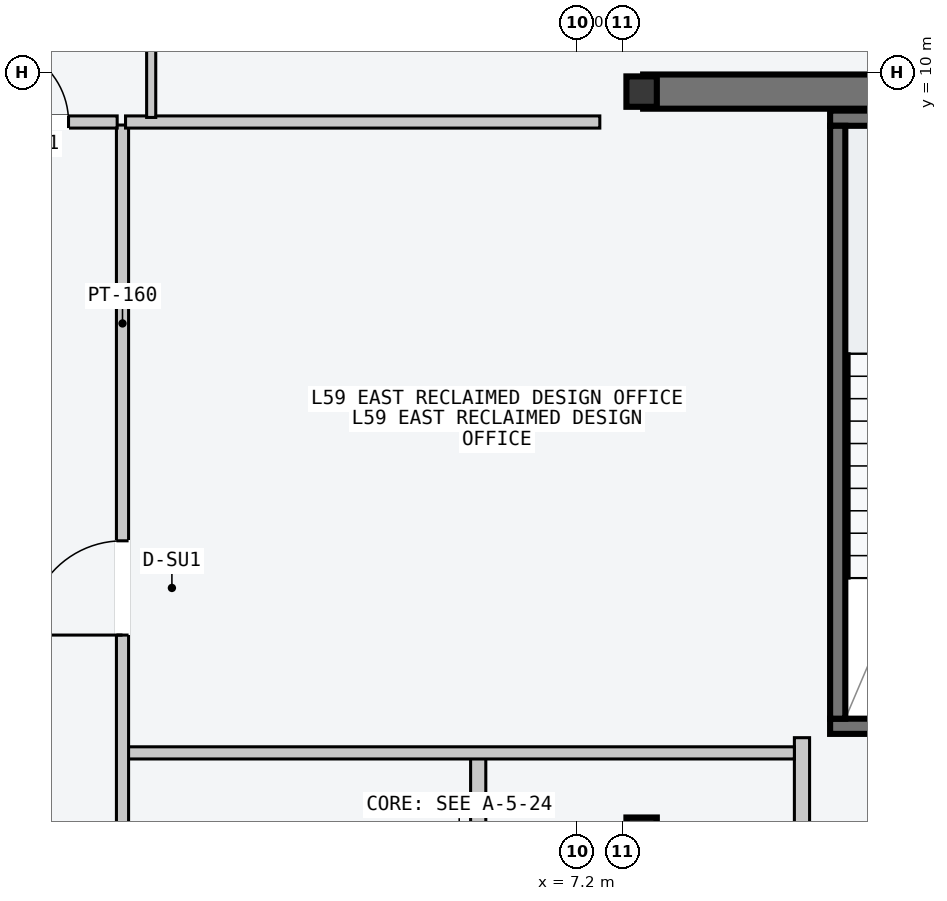
"""IFC4 building model, lengths in metres.
Left out: names, types, materials, properties, quantities, classifications, styles, units other than length and angle.
Written with IfcOpenShell. Run it as: python <this file> out.ifc"""

import sys

from ifc_helpers import new_model, si_unit, direction, frame, frame_2d, origin, origin_2d, place, context, subcontext, project, spatial, rectangle, i_section, extrude, element, fill, save


model = new_model("IFC4")
c1 = context("Model", 3, precision=1e-05, world=origin(), true_north=direction((0.0, 1.0)))
c2 = subcontext(c1, "Body", "Model", "MODEL_VIEW")
j1 = project(units=[si_unit("LENGTHUNIT", "METRE"), si_unit("PLANEANGLEUNIT", "RADIAN")], contexts=[c1])
p1 = place(None, origin())
s1 = spatial("IfcSite", under=j1, at=p1, CompositionType="ELEMENT")
p2 = place(p1, origin())
s2 = spatial("IfcBuilding", under=s1, at=p2, CompositionType="ELEMENT")
p3 = place(p2, frame((0.0, 0.0, 225.6)))
s3 = spatial("IfcBuildingStorey", under=s2, at=p3, CompositionType="ELEMENT", Elevation=225.6)
p4 = place(p3, frame((8.07, 9.75, -0.2), z_axis=(0.0, 0.0, 1.0), x_axis=(1.0, 0.0, 0.0)))
e1 = element("IfcWall", 1, at=p4, inside=s3, PredefinedType="SHEAR", context=c2, shape_type="SweptSolid", body=[
    extrude(rectangle(XDim=6.46, YDim=0.45, at=frame_2d((3.23, 0.0))), origin(), (0.0, 0.0, 1.0), 3.6),
])
p5 = place(p3, frame((10.53, 1.4, -0.2), z_axis=(0.0, 0.0, 1.0), x_axis=(1.0, 0.0, 0.0)))
e2 = element("IfcWall", 2, at=p5, inside=s3, PredefinedType="SOLIDWALL", context=c2, shape_type="SweptSolid", body=[
    extrude(rectangle(XDim=3.72, YDim=0.2, at=frame_2d((1.86, 0.0))), origin(), (0.0, 0.0, 1.0), 3.6),
])
p6 = place(p5, frame((1.5, 0.0, 0.2)))
e3 = element("IfcOpeningElement", 3, at=p6, cuts=e2, PredefinedType="OPENING", context=c2, shape_type="SweptSolid", body=[
    extrude(rectangle(XDim=1.12, YDim=2.18, at=frame_2d((0.56, 1.09))), frame((0.0, 0.11, 0.0), z_axis=(0.0, -1.0, 0.0), x_axis=(1.0, 0.0, 0.0)), (0.0, 0.0, 1.0), 0.22),
])
p7 = place(p3, frame((10.53, 9.4, -0.2), z_axis=(0.0, 0.0, 1.0), x_axis=(1.0, 0.0, 0.0)))
e4 = element("IfcWall", 4, at=p7, inside=s3, PredefinedType="SOLIDWALL", context=c2, shape_type="SweptSolid", body=[
    extrude(rectangle(XDim=3.72, YDim=0.2, at=frame_2d((1.86, 0.0))), origin(), (0.0, 0.0, 1.0), 3.6),
])
p8 = place(p3, frame((10.63, 1.5, -0.2), z_axis=(0.0, 0.0, 1.0), x_axis=(0.0, 1.0, 0.0)))
e5 = element("IfcWall", 5, at=p8, inside=s3, PredefinedType="SOLIDWALL", context=c2, shape_type="SweptSolid", body=[
    extrude(rectangle(XDim=7.8, YDim=0.2, at=frame_2d((3.9, 0.0))), origin(), (0.0, 0.0, 1.0), 3.6),
])
for number, where, z_axis, x_axis in (
    (6, (8.05, 0.0, 0.0), (0.0, 0.0, 1.0), (1.0, 0.0, 0.0)),
    (7, (8.05, 9.75, 0.0), (0.0, 0.0, 1.0), (1.0, 0.0, 0.0)),
):
    element("IfcColumn", number, at=place(p3, frame(where, z_axis=z_axis, x_axis=x_axis)), inside=s3, PredefinedType="COLUMN", context=c2, shape_type="SweptSolid", body=[
        extrude(i_section(OverallWidth=0.4, OverallDepth=0.4, WebThickness=0.013, FlangeThickness=0.021, at=origin_2d()), origin(), (0.0, 0.0, 1.0), 3.6),
    ])
p9 = place(p3, frame((5.9, -9.45, 0.0), z_axis=(0.0, 0.0, 1.0), x_axis=(0.0, 1.0, 0.0)))
e8 = element("IfcWall", 8, at=p9, inside=s3, PredefinedType="PARTITIONING", context=c2, shape_type="SweptSolid", body=[
    extrude(rectangle(XDim=10.5, YDim=0.2, at=frame_2d((5.25, 0.0))), origin(), (0.0, 0.0, 1.0), 3.4),
])
p10 = place(p9, frame((3.9, 0.0, 0.0)))
e9 = element("IfcOpeningElement", 9, at=p10, cuts=e8, PredefinedType="OPENING", context=c2, shape_type="SweptSolid", body=[
    extrude(rectangle(XDim=1.5, YDim=2.2, at=frame_2d((0.75, 1.1))), frame((0.0, 0.11, 0.0), z_axis=(0.0, -1.0, 0.0), x_axis=(1.0, 0.0, 0.0)), (0.0, 0.0, 1.0), 0.22),
])
p11 = place(p3, frame((10.16, -2.55, 0.0), z_axis=(0.0, 0.0, 1.0), x_axis=(0.0, 1.0, 0.0)))
e10 = element("IfcWall", 10, at=p11, inside=s3, PredefinedType="PARTITIONING", context=c2, shape_type="SweptSolid", body=[
    extrude(rectangle(XDim=3.8, YDim=0.2, at=frame_2d((1.9, 0.0))), origin(), (0.0, 0.0, 1.0), 3.4),
])
p12 = place(p11, frame((1.3, 0.0, 0.0)))
e11 = element("IfcOpeningElement", 11, at=p12, cuts=e10, PredefinedType="OPENING", context=c2, shape_type="SweptSolid", body=[
    extrude(rectangle(XDim=1.1, YDim=2.15, at=frame_2d((0.55, 1.075))), frame((0.0, 0.11, 0.0), z_axis=(0.0, -1.0, 0.0), x_axis=(1.0, 0.0, 0.0)), (0.0, 0.0, 1.0), 0.22),
])
p13 = place(p3, frame((1.26, 1.05, 0.0), z_axis=(0.0, 0.0, 1.0), x_axis=(1.0, 0.0, 0.0)))
e12 = element("IfcWall", 12, at=p13, inside=s3, PredefinedType="PARTITIONING", context=c2, shape_type="SweptSolid", body=[
    extrude(rectangle(XDim=8.8, YDim=0.16, at=frame_2d((4.4, 0.0))), origin(), (0.0, 0.0, 1.0), 3.4),
])
p14 = place(p3, frame((1.22, -3.5, 0.0), z_axis=(0.0, 0.0, 1.0), x_axis=(0.0, 1.0, 0.0)))
e13 = element("IfcWall", 13, at=p14, inside=s3, PredefinedType="PARTITIONING", context=c2, shape_type="SweptSolid", body=[
    extrude(rectangle(XDim=12.81, YDim=0.16, at=frame_2d((6.405, 0.0))), origin(), (0.0, 0.0, 1.0), 3.4),
])
p15 = place(p14, frame((6.1, 0.0, 0.0)))
e14 = element("IfcOpeningElement", 14, at=p15, cuts=e13, PredefinedType="OPENING", context=c2, shape_type="SweptSolid", body=[
    extrude(rectangle(XDim=1.24, YDim=2.24, at=frame_2d((0.62, 1.12))), frame((0.0, 0.09, 0.0), z_axis=(0.0, -1.0, 0.0), x_axis=(1.0, 0.0, 0.0)), (0.0, 0.0, 1.0), 0.18),
])
p16 = place(p14, frame((1.6, 0.0, 0.0)))
e15 = element("IfcOpeningElement", 15, at=p16, cuts=e13, PredefinedType="OPENING", context=c2, shape_type="SweptSolid", body=[
    extrude(rectangle(XDim=0.96, YDim=2.18, at=frame_2d((0.48, 1.09))), frame((0.0, 0.09, 0.0), z_axis=(0.0, -1.0, 0.0), x_axis=(1.0, 0.0, 0.0)), (0.0, 0.0, 1.0), 0.18),
])
p17 = place(p3, frame((1.26, 9.35, 0.0), z_axis=(0.0, 0.0, 1.0), x_axis=(1.0, 0.0, 0.0)))
e16 = element("IfcWall", 16, at=p17, inside=s3, PredefinedType="PARTITIONING", context=c2, shape_type="SweptSolid", body=[
    extrude(rectangle(XDim=6.24, YDim=0.16, at=frame_2d((3.12, 0.0))), origin(), (0.0, 0.0, 1.0), 3.4),
])
p18 = place(p3, frame((1.597, 9.41, 0.0), z_axis=(0.0, 0.0, 1.0), x_axis=(0.0, 1.0, 0.0)))
e17 = element("IfcWall", 17, at=p18, inside=s3, PredefinedType="PARTITIONING", context=c2, shape_type="SweptSolid", body=[
    extrude(rectangle(XDim=7.14, YDim=0.12, at=frame_2d((3.57, 0.0))), origin(), (0.0, 0.0, 1.0), 3.4),
])
p19 = place(p18, frame((1.15, 0.0, 0.0)))
e18 = element("IfcOpeningElement", 18, at=p19, cuts=e17, PredefinedType="OPENING", context=c2, shape_type="SweptSolid", body=[
    extrude(rectangle(XDim=0.96, YDim=2.18, at=frame_2d((0.48, 1.09))), frame((0.0, 0.07, 0.0), z_axis=(0.0, -1.0, 0.0), x_axis=(1.0, 0.0, 0.0)), (0.0, 0.0, 1.0), 0.14),
])
p20 = place(p3, frame((-1.15, 9.35, 0.0), z_axis=(0.0, 0.0, 1.0), x_axis=(1.0, 0.0, 0.0)))
e19 = element("IfcWall", 19, at=p20, inside=s3, PredefinedType="PARTITIONING", context=c2, shape_type="SweptSolid", body=[
    extrude(rectangle(XDim=2.3, YDim=0.16, at=frame_2d((1.15, 0.0))), origin(), (0.0, 0.0, 1.0), 3.4),
])
p21 = place(p20, frame((0.64, 0.0, 0.0)))
e20 = element("IfcOpeningElement", 20, at=p21, cuts=e19, PredefinedType="OPENING", context=c2, shape_type="SweptSolid", body=[
    extrude(rectangle(XDim=1.02, YDim=2.2, at=frame_2d((0.51, 1.1))), frame((0.0, 0.09, 0.0), z_axis=(0.0, -1.0, 0.0), x_axis=(1.0, 0.0, 0.0)), (0.0, 0.0, 1.0), 0.18),
])
p22 = place(p15, origin())
e21 = element("IfcDoor", 21, at=p22, inside=s3, OperationType="SINGLE_SWING_LEFT", PredefinedType="DOOR", context=c2, shape_type="SweptSolid", body=[
    extrude(rectangle(XDim=1.24, YDim=2.24, at=frame_2d((0.62, 1.12))), frame((0.0, 0.025, 0.0), z_axis=(0.0, -1.0, 0.0), x_axis=(1.0, 0.0, 0.0)), (0.0, 0.0, 1.0), 0.05),
])
fill(e14, e21)
p23 = place(p21, origin())
e22 = element("IfcDoor", 22, at=p23, inside=s3, OperationType="SINGLE_SWING_LEFT", PredefinedType="DOOR", context=c2, shape_type="SweptSolid", body=[
    extrude(rectangle(XDim=1.02, YDim=2.2, at=frame_2d((0.51, 1.1))), frame((0.0, 0.025, 0.0), z_axis=(0.0, -1.0, 0.0), x_axis=(1.0, 0.0, 0.0)), (0.0, 0.0, 1.0), 0.05),
])
fill(e20, e22)
save(model, sys.argv[1])
